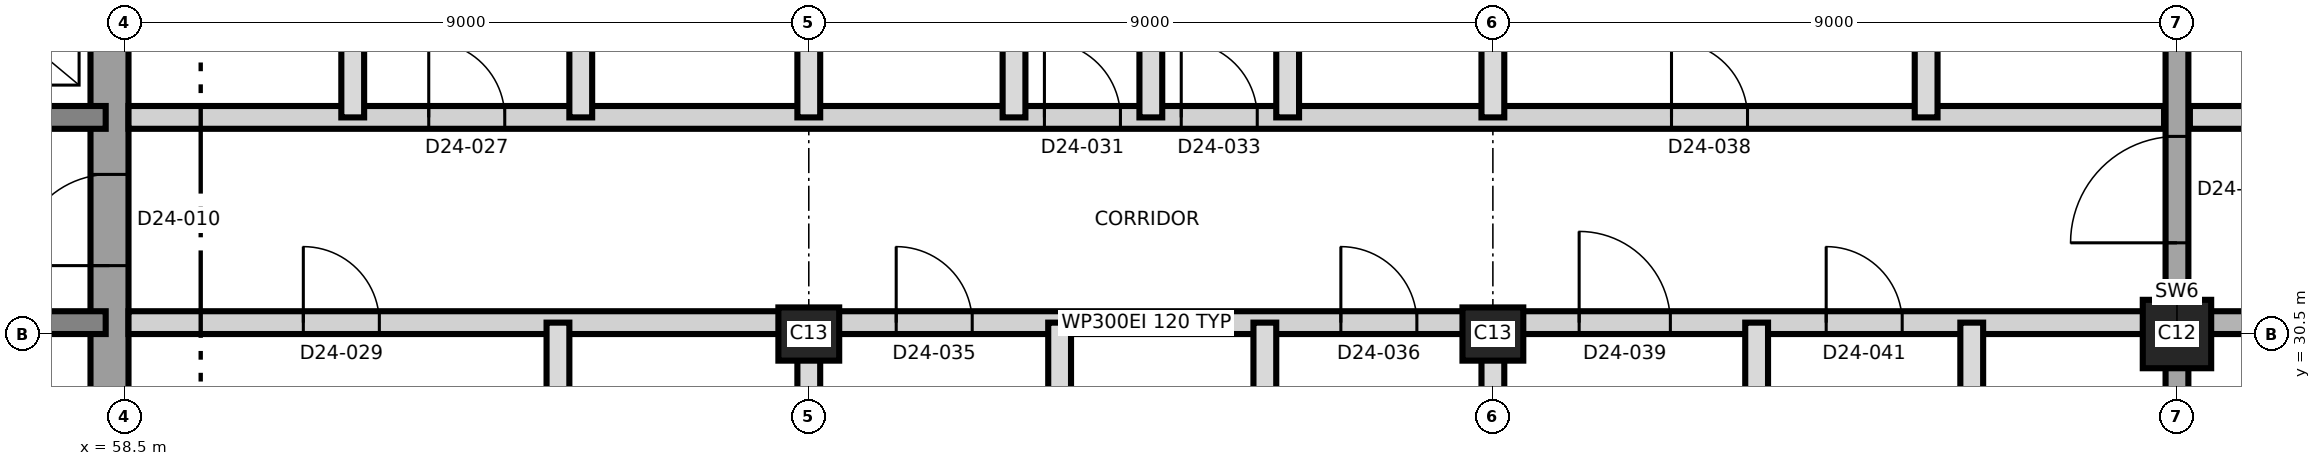
"""IFC4 building model, lengths in metres.
Left out: names, types, materials, properties, quantities, classifications, styles, units other than length and angle.
Written with IfcOpenShell. Run it as: python <this file> out.ifc"""

import sys

from ifc_helpers import new_model, si_unit, direction, frame, frame_2d, origin, origin_2d, place, context, subcontext, project, spatial, rectangle, extrude, element, fill, save


model = new_model("IFC4")
c1 = context("Model", 3, precision=1e-05, world=origin(), true_north=direction((0.0, 1.0)))
c2 = subcontext(c1, "Body", "Model", "MODEL_VIEW")
j1 = project(units=[si_unit("LENGTHUNIT", "METRE"), si_unit("PLANEANGLEUNIT", "RADIAN")], contexts=[c1])
p1 = place(None, origin())
s1 = spatial("IfcSite", under=j1, at=p1, CompositionType="ELEMENT")
p2 = place(p1, origin())
s2 = spatial("IfcBuilding", under=s1, at=p2, CompositionType="ELEMENT")
p3 = place(p2, frame((0.0, 0.0, 218.0)))
s3 = spatial("IfcBuildingStorey", under=s2, at=p3, CompositionType="ELEMENT", Elevation=218.0)
p4 = place(p3, frame((58.3, 21.25, 0.0), z_axis=(0.0, 0.0, 1.0), x_axis=(0.0, 1.0, 0.0)))
e1 = element("IfcWall", 1, at=p4, inside=s3, PredefinedType="SHEAR", context=c2, shape_type="SweptSolid", body=[
    extrude(rectangle(XDim=18.5, YDim=0.5, at=frame_2d((9.25, 0.0))), origin(), (0.0, 0.0, 1.0), 3.7),
])
p5 = place(p4, frame((10.15, 0.0, 0.0)))
e2 = element("IfcOpeningElement", 2, at=p5, cuts=e1, PredefinedType="OPENING", context=c2, shape_type="SweptSolid", body=[
    extrude(rectangle(XDim=1.2, YDim=2.1, at=frame_2d((0.6, 1.05))), frame((0.0, 0.26, 0.0), z_axis=(0.0, -1.0, 0.0), x_axis=(1.0, 0.0, 0.0)), (0.0, 0.0, 1.0), 0.52),
])
p6 = place(p3, frame((31.75, 30.65, 0.0), z_axis=(0.0, 0.0, 1.0), x_axis=(1.0, 0.0, 0.0)))
e3 = element("IfcWall", 3, at=p6, inside=s3, PredefinedType="SHEAR", context=c2, shape_type="SweptSolid", body=[
    extrude(rectangle(XDim=26.5, YDim=0.3, at=frame_2d((13.25, 0.0))), origin(), (0.0, 0.0, 1.0), 3.7),
])
p7 = place(p6, frame((24.75, 0.0, 0.0)))
e4 = element("IfcOpeningElement", 4, at=p7, cuts=e3, PredefinedType="OPENING", context=c2, shape_type="SweptSolid", body=[
    extrude(rectangle(XDim=1.0, YDim=2.1, at=frame_2d((0.5, 1.05))), frame((0.0, 0.16, 0.0), z_axis=(0.0, -1.0, 0.0), x_axis=(1.0, 0.0, 0.0)), (0.0, 0.0, 1.0), 0.32),
])
p8 = place(p3, frame((31.75, 33.35, 0.0), z_axis=(0.0, 0.0, 1.0), x_axis=(1.0, 0.0, 0.0)))
e5 = element("IfcWall", 5, at=p8, inside=s3, PredefinedType="SHEAR", context=c2, shape_type="SweptSolid", body=[
    extrude(rectangle(XDim=26.5, YDim=0.3, at=frame_2d((13.25, 0.0))), origin(), (0.0, 0.0, 1.0), 3.7),
])
p9 = place(p8, frame((13.9, 0.0, 0.0)))
e6 = element("IfcOpeningElement", 6, at=p9, cuts=e5, PredefinedType="OPENING", context=c2, shape_type="SweptSolid", body=[
    extrude(rectangle(XDim=1.4, YDim=2.1, at=frame_2d((0.7, 1.05))), frame((0.0, 0.16, 0.0), z_axis=(0.0, -1.0, 0.0), x_axis=(1.0, 0.0, 0.0)), (0.0, 0.0, 1.0), 0.32),
])
p10 = place(p8, frame((5.375, 0.0, 0.0)))
e7 = element("IfcOpeningElement", 7, at=p10, cuts=e5, PredefinedType="OPENING", context=c2, shape_type="SweptSolid", body=[
    extrude(rectangle(XDim=1.2, YDim=2.1, at=frame_2d((0.6, 1.05))), frame((0.0, 0.16, 0.0), z_axis=(0.0, -1.0, 0.0), x_axis=(1.0, 0.0, 0.0)), (0.0, 0.0, 1.0), 0.32),
])
p11 = place(p8, frame((19.925, 0.0, 0.0)))
e8 = element("IfcOpeningElement", 8, at=p11, cuts=e5, PredefinedType="OPENING", context=c2, shape_type="SweptSolid", body=[
    extrude(rectangle(XDim=1.2, YDim=2.1, at=frame_2d((0.6, 1.05))), frame((0.0, 0.16, 0.0), z_axis=(0.0, -1.0, 0.0), x_axis=(1.0, 0.0, 0.0)), (0.0, 0.0, 1.0), 0.32),
])
for number, where, z_axis, x_axis in (
    (9, (67.5, 30.5, 0.0), (0.0, 0.0, 1.0), (1.0, 0.0, 0.0)),
    (10, (76.5, 30.5, 0.0), (0.0, 0.0, 1.0), (1.0, 0.0, 0.0)),
):
    element("IfcColumn", number, at=place(p3, frame(where, z_axis=z_axis, x_axis=x_axis)), inside=s3, PredefinedType="COLUMN", context=c2, shape_type="SweptSolid", body=[
        extrude(rectangle(XDim=0.8, YDim=0.7, at=origin_2d()), origin(), (0.0, 0.0, 1.0), 3.7),
    ])
p12 = place(p3, frame((85.5, 30.5, 0.0), z_axis=(0.0, 0.0, 1.0), x_axis=(1.0, 0.0, 0.0)))
e11 = element("IfcColumn", 11, at=p12, inside=s3, PredefinedType="COLUMN", context=c2, shape_type="SweptSolid", body=[
    extrude(rectangle(XDim=0.9, YDim=0.9, at=origin_2d()), origin(), (0.0, 0.0, 1.0), 3.7),
])
p13 = place(p3, frame((85.5, 21.53, 0.0), z_axis=(0.0, 0.0, 1.0), x_axis=(0.0, 1.0, 0.0)))
e12 = element("IfcWall", 12, at=p13, inside=s3, PredefinedType="SHEAR", context=c2, shape_type="SweptSolid", body=[
    extrude(rectangle(XDim=17.94, YDim=0.3, at=frame_2d((8.97, 0.0))), origin(), (0.0, 0.0, 1.0), 3.7),
])
p14 = place(p13, frame((10.17, 0.0, 0.0)))
e13 = element("IfcOpeningElement", 13, at=p14, cuts=e12, PredefinedType="OPENING", context=c2, shape_type="SweptSolid", body=[
    extrude(rectangle(XDim=1.4, YDim=2.1, at=frame_2d((0.7, 1.05))), frame((0.0, 0.16, 0.0), z_axis=(0.0, -1.0, 0.0), x_axis=(1.0, 0.0, 0.0)), (0.0, 0.0, 1.0), 0.32),
])
p15 = place(p3, frame((58.55, 30.65, 0.0), z_axis=(0.0, 0.0, 1.0), x_axis=(1.0, 0.0, 0.0)))
e14 = element("IfcWall", 14, at=p15, inside=s3, PredefinedType="PARTITIONING", context=c2, shape_type="SweptSolid", body=[
    extrude(rectangle(XDim=26.78, YDim=0.3, at=frame_2d((13.39, 0.0))), origin(), (0.0, 0.0, 1.0), 3.4),
])
p16 = place(p15, frame((2.3, 0.0, 0.0)))
e15 = element("IfcOpeningElement", 15, at=p16, cuts=e14, PredefinedType="OPENING", context=c2, shape_type="SweptSolid", body=[
    extrude(rectangle(XDim=1.0, YDim=2.4, at=frame_2d((0.5, 1.2))), frame((0.0, 0.16, 0.0), z_axis=(0.0, -1.0, 0.0), x_axis=(1.0, 0.0, 0.0)), (0.0, 0.0, 1.0), 0.32),
])
p17 = place(p15, frame((10.1, 0.0, 0.0)))
e16 = element("IfcOpeningElement", 16, at=p17, cuts=e14, PredefinedType="OPENING", context=c2, shape_type="SweptSolid", body=[
    extrude(rectangle(XDim=1.0, YDim=2.1, at=frame_2d((0.5, 1.05))), frame((0.0, 0.16, 0.0), z_axis=(0.0, -1.0, 0.0), x_axis=(1.0, 0.0, 0.0)), (0.0, 0.0, 1.0), 0.32),
])
p18 = place(p15, frame((15.95, 0.0, 0.0)))
e17 = element("IfcOpeningElement", 17, at=p18, cuts=e14, PredefinedType="OPENING", context=c2, shape_type="SweptSolid", body=[
    extrude(rectangle(XDim=1.0, YDim=2.1, at=frame_2d((0.5, 1.05))), frame((0.0, 0.16, 0.0), z_axis=(0.0, -1.0, 0.0), x_axis=(1.0, 0.0, 0.0)), (0.0, 0.0, 1.0), 0.32),
])
p19 = place(p15, frame((19.085, 0.0, 0.0)))
e18 = element("IfcOpeningElement", 18, at=p19, cuts=e14, PredefinedType="OPENING", context=c2, shape_type="SweptSolid", body=[
    extrude(rectangle(XDim=1.2, YDim=2.1, at=frame_2d((0.6, 1.05))), frame((0.0, 0.16, 0.0), z_axis=(0.0, -1.0, 0.0), x_axis=(1.0, 0.0, 0.0)), (0.0, 0.0, 1.0), 0.32),
])
p20 = place(p15, frame((22.335, 0.0, 0.0)))
e19 = element("IfcOpeningElement", 19, at=p20, cuts=e14, PredefinedType="OPENING", context=c2, shape_type="SweptSolid", body=[
    extrude(rectangle(XDim=1.0, YDim=2.1, at=frame_2d((0.5, 1.05))), frame((0.0, 0.16, 0.0), z_axis=(0.0, -1.0, 0.0), x_axis=(1.0, 0.0, 0.0)), (0.0, 0.0, 1.0), 0.32),
])
p21 = place(p3, frame((85.67, 30.65, 0.0), z_axis=(0.0, 0.0, 1.0), x_axis=(1.0, 0.0, 0.0)))
e20 = element("IfcWall", 20, at=p21, inside=s3, PredefinedType="SHEAR", context=c2, shape_type="SweptSolid", body=[
    extrude(rectangle(XDim=8.8, YDim=0.3, at=frame_2d((4.4, 0.0))), origin(), (0.0, 0.0, 1.0), 3.4),
])
p22 = place(p21, frame((2.08, 0.0, 0.0)))
e21 = element("IfcOpeningElement", 21, at=p22, cuts=e20, PredefinedType="OPENING", context=c2, shape_type="SweptSolid", body=[
    extrude(rectangle(XDim=1.2, YDim=2.1, at=frame_2d((0.6, 1.05))), frame((0.0, 0.16, 0.0), z_axis=(0.0, -1.0, 0.0), x_axis=(1.0, 0.0, 0.0)), (0.0, 0.0, 1.0), 0.32),
])
p23 = place(p21, frame((5.63, 0.0, 0.0)))
e22 = element("IfcOpeningElement", 22, at=p23, cuts=e20, PredefinedType="OPENING", context=c2, shape_type="SweptSolid", body=[
    extrude(rectangle(XDim=1.0, YDim=2.1, at=frame_2d((0.5, 1.05))), frame((0.0, 0.16, 0.0), z_axis=(0.0, -1.0, 0.0), x_axis=(1.0, 0.0, 0.0)), (0.0, 0.0, 1.0), 0.32),
])
p24 = place(p3, frame((58.55, 33.35, 0.0), z_axis=(0.0, 0.0, 1.0), x_axis=(1.0, 0.0, 0.0)))
e23 = element("IfcWall", 23, at=p24, inside=s3, PredefinedType="PARTITIONING", context=c2, shape_type="SweptSolid", body=[
    extrude(rectangle(XDim=26.78, YDim=0.3, at=frame_2d((13.39, 0.0))), origin(), (0.0, 0.0, 1.0), 3.4),
])
p25 = place(p24, frame((3.95, 0.0, 0.0)))
e24 = element("IfcOpeningElement", 24, at=p25, cuts=e23, PredefinedType="OPENING", context=c2, shape_type="SweptSolid", body=[
    extrude(rectangle(XDim=1.0, YDim=2.4, at=frame_2d((0.5, 1.2))), frame((0.0, 0.16, 0.0), z_axis=(0.0, -1.0, 0.0), x_axis=(1.0, 0.0, 0.0)), (0.0, 0.0, 1.0), 0.32),
])
p26 = place(p24, frame((12.05, 0.0, 0.0)))
e25 = element("IfcOpeningElement", 25, at=p26, cuts=e23, PredefinedType="OPENING", context=c2, shape_type="SweptSolid", body=[
    extrude(rectangle(XDim=1.0, YDim=2.1, at=frame_2d((0.5, 1.05))), frame((0.0, 0.16, 0.0), z_axis=(0.0, -1.0, 0.0), x_axis=(1.0, 0.0, 0.0)), (0.0, 0.0, 1.0), 0.32),
])
p27 = place(p24, frame((13.85, 0.0, 0.0)))
e26 = element("IfcOpeningElement", 26, at=p27, cuts=e23, PredefinedType="OPENING", context=c2, shape_type="SweptSolid", body=[
    extrude(rectangle(XDim=1.0, YDim=2.1, at=frame_2d((0.5, 1.05))), frame((0.0, 0.16, 0.0), z_axis=(0.0, -1.0, 0.0), x_axis=(1.0, 0.0, 0.0)), (0.0, 0.0, 1.0), 0.32),
])
p28 = place(p24, frame((20.3, 0.0, 0.0)))
e27 = element("IfcOpeningElement", 27, at=p28, cuts=e23, PredefinedType="OPENING", context=c2, shape_type="SweptSolid", body=[
    extrude(rectangle(XDim=1.0, YDim=2.4, at=frame_2d((0.5, 1.2))), frame((0.0, 0.16, 0.0), z_axis=(0.0, -1.0, 0.0), x_axis=(1.0, 0.0, 0.0)), (0.0, 0.0, 1.0), 0.32),
])
p29 = place(p3, frame((85.67, 33.35, 0.0), z_axis=(0.0, 0.0, 1.0), x_axis=(1.0, 0.0, 0.0)))
e28 = element("IfcWall", 28, at=p29, inside=s3, PredefinedType="PARTITIONING", context=c2, shape_type="SweptSolid", body=[
    extrude(rectangle(XDim=8.685, YDim=0.3, at=frame_2d((4.343, 0.0))), origin(), (0.0, 0.0, 1.0), 3.4),
])
p30 = place(p29, frame((1.83, 0.0, 0.0)))
e29 = element("IfcOpeningElement", 29, at=p30, cuts=e28, PredefinedType="OPENING", context=c2, shape_type="SweptSolid", body=[
    extrude(rectangle(XDim=1.0, YDim=2.1, at=frame_2d((0.5, 1.05))), frame((0.0, 0.16, 0.0), z_axis=(0.0, -1.0, 0.0), x_axis=(1.0, 0.0, 0.0)), (0.0, 0.0, 1.0), 0.32),
])
p31 = place(p29, frame((5.63, 0.0, 0.0)))
e30 = element("IfcOpeningElement", 30, at=p31, cuts=e28, PredefinedType="OPENING", context=c2, shape_type="SweptSolid", body=[
    extrude(rectangle(XDim=1.0, YDim=2.1, at=frame_2d((0.5, 1.05))), frame((0.0, 0.16, 0.0), z_axis=(0.0, -1.0, 0.0), x_axis=(1.0, 0.0, 0.0)), (0.0, 0.0, 1.0), 0.32),
])
p32 = place(p3, frame((61.5, 33.35, 0.0), z_axis=(0.0, 0.0, 1.0), x_axis=(0.0, 1.0, 0.0)))
e31 = element("IfcWall", 31, at=p32, inside=s3, PredefinedType="PARTITIONING", context=c2, shape_type="SweptSolid", body=[
    extrude(rectangle(XDim=3.3, YDim=0.3, at=frame_2d((1.65, 0.0))), origin(), (0.0, 0.0, 1.0), 3.4),
])
p33 = place(p3, frame((64.2, 27.15, 0.0), z_axis=(0.0, 0.0, 1.0), x_axis=(0.0, 1.0, 0.0)))
e32 = element("IfcWall", 32, at=p33, inside=s3, PredefinedType="PARTITIONING", context=c2, shape_type="SweptSolid", body=[
    extrude(rectangle(XDim=3.5, YDim=0.3, at=frame_2d((1.75, 0.0))), origin(), (0.0, 0.0, 1.0), 3.4),
])
p34 = place(p3, frame((64.5, 33.35, 0.0), z_axis=(0.0, 0.0, 1.0), x_axis=(0.0, 1.0, 0.0)))
e33 = element("IfcWall", 33, at=p34, inside=s3, PredefinedType="PARTITIONING", context=c2, shape_type="SweptSolid", body=[
    extrude(rectangle(XDim=3.3, YDim=0.3, at=frame_2d((1.65, 0.0))), origin(), (0.0, 0.0, 1.0), 3.4),
])
p35 = place(p3, frame((67.5, 21.53, 0.0), z_axis=(0.0, 0.0, 1.0), x_axis=(0.0, 1.0, 0.0)))
e34 = element("IfcWall", 34, at=p35, inside=s3, PredefinedType="PARTITIONING", context=c2, shape_type="SweptSolid", body=[
    extrude(rectangle(XDim=9.12, YDim=0.3, at=frame_2d((4.56, 0.0))), origin(), (0.0, 0.0, 1.0), 3.4),
])
p36 = place(p3, frame((67.5, 33.35, 0.0), z_axis=(0.0, 0.0, 1.0), x_axis=(0.0, 1.0, 0.0)))
e35 = element("IfcWall", 35, at=p36, inside=s3, PredefinedType="PARTITIONING", context=c2, shape_type="SweptSolid", body=[
    extrude(rectangle(XDim=6.12, YDim=0.3, at=frame_2d((3.06, 0.0))), origin(), (0.0, 0.0, 1.0), 3.4),
])
for number, where, z_axis, x_axis in (
    (36, (70.2, 33.35, 0.0), (0.0, 0.0, 1.0), (0.0, 1.0, 0.0)),
    (37, (70.8, 27.45, 0.0), (0.0, 0.0, 1.0), (0.0, 1.0, 0.0)),
):
    element("IfcWall", number, at=place(p3, frame(where, z_axis=z_axis, x_axis=x_axis)), inside=s3, PredefinedType="PARTITIONING", context=c2, shape_type="SweptSolid", body=[
        extrude(rectangle(XDim=3.2, YDim=0.3, at=frame_2d((1.6, 0.0))), origin(), (0.0, 0.0, 1.0), 3.4),
    ])
p37 = place(p3, frame((72.0, 33.35, 0.0), z_axis=(0.0, 0.0, 1.0), x_axis=(0.0, 1.0, 0.0)))
e38 = element("IfcWall", 38, at=p37, inside=s3, PredefinedType="PARTITIONING", context=c2, shape_type="SweptSolid", body=[
    extrude(rectangle(XDim=6.3, YDim=0.3, at=frame_2d((3.15, 0.0))), origin(), (0.0, 0.0, 1.0), 3.4),
])
p38 = place(p3, frame((73.5, 21.53, 0.0), z_axis=(0.0, 0.0, 1.0), x_axis=(0.0, 1.0, 0.0)))
e39 = element("IfcWall", 39, at=p38, inside=s3, PredefinedType="PARTITIONING", context=c2, shape_type="SweptSolid", body=[
    extrude(rectangle(XDim=9.12, YDim=0.3, at=frame_2d((4.56, 0.0))), origin(), (0.0, 0.0, 1.0), 3.4),
])
p39 = place(p3, frame((73.8, 33.35, 0.0), z_axis=(0.0, 0.0, 1.0), x_axis=(0.0, 1.0, 0.0)))
e40 = element("IfcWall", 40, at=p39, inside=s3, PredefinedType="PARTITIONING", context=c2, shape_type="SweptSolid", body=[
    extrude(rectangle(XDim=3.2, YDim=0.3, at=frame_2d((1.6, 0.0))), origin(), (0.0, 0.0, 1.0), 3.4),
])
p40 = place(p3, frame((76.5, 21.53, 0.0), z_axis=(0.0, 0.0, 1.0), x_axis=(0.0, 1.0, 0.0)))
e41 = element("IfcWall", 41, at=p40, inside=s3, PredefinedType="PARTITIONING", context=c2, shape_type="SweptSolid", body=[
    extrude(rectangle(XDim=9.12, YDim=0.3, at=frame_2d((4.56, 0.0))), origin(), (0.0, 0.0, 1.0), 3.4),
])
p41 = place(p3, frame((76.5, 33.35, 0.0), z_axis=(0.0, 0.0, 1.0), x_axis=(0.0, 1.0, 0.0)))
e42 = element("IfcWall", 42, at=p41, inside=s3, PredefinedType="PARTITIONING", context=c2, shape_type="SweptSolid", body=[
    extrude(rectangle(XDim=6.12, YDim=0.3, at=frame_2d((3.06, 0.0))), origin(), (0.0, 0.0, 1.0), 3.4),
])
p42 = place(p3, frame((79.97, 21.53, 0.0), z_axis=(0.0, 0.0, 1.0), x_axis=(0.0, 1.0, 0.0)))
e43 = element("IfcWall", 43, at=p42, inside=s3, PredefinedType="PARTITIONING", context=c2, shape_type="SweptSolid", body=[
    extrude(rectangle(XDim=9.12, YDim=0.3, at=frame_2d((4.56, 0.0))), origin(), (0.0, 0.0, 1.0), 3.4),
])
p43 = place(p3, frame((82.2, 33.35, 0.0), z_axis=(0.0, 0.0, 1.0), x_axis=(0.0, 1.0, 0.0)))
e44 = element("IfcWall", 44, at=p43, inside=s3, PredefinedType="PARTITIONING", context=c2, shape_type="SweptSolid", body=[
    extrude(rectangle(XDim=3.5, YDim=0.3, at=frame_2d((1.75, 0.0))), origin(), (0.0, 0.0, 1.0), 3.4),
])
p44 = place(p3, frame((82.8, 27.45, 0.0), z_axis=(0.0, 0.0, 1.0), x_axis=(0.0, 1.0, 0.0)))
e45 = element("IfcWall", 45, at=p44, inside=s3, PredefinedType="PARTITIONING", context=c2, shape_type="SweptSolid", body=[
    extrude(rectangle(XDim=3.2, YDim=0.3, at=frame_2d((1.6, 0.0))), origin(), (0.0, 0.0, 1.0), 3.4),
])
p45 = place(p5, origin())
e46 = element("IfcDoor", 46, at=p45, inside=s3, OperationType="SINGLE_SWING_LEFT", PredefinedType="DOOR", context=c2, shape_type="SweptSolid", body=[
    extrude(rectangle(XDim=1.2, YDim=2.1, at=frame_2d((0.6, 1.05))), frame((0.0, 0.025, 0.0), z_axis=(0.0, -1.0, 0.0), x_axis=(1.0, 0.0, 0.0)), (0.0, 0.0, 1.0), 0.05),
])
fill(e2, e46)
p46 = place(p25, origin())
e47 = element("IfcDoor", 47, at=p46, inside=s3, OperationType="SINGLE_SWING_LEFT", PredefinedType="DOOR", context=c2, shape_type="SweptSolid", body=[
    extrude(rectangle(XDim=1.0, YDim=2.4, at=frame_2d((0.5, 1.2))), frame((0.0, 0.025, 0.0), z_axis=(0.0, -1.0, 0.0), x_axis=(1.0, 0.0, 0.0)), (0.0, 0.0, 1.0), 0.05),
])
fill(e24, e47)
p47 = place(p16, origin())
e48 = element("IfcDoor", 48, at=p47, inside=s3, OperationType="SINGLE_SWING_LEFT", PredefinedType="DOOR", context=c2, shape_type="SweptSolid", body=[
    extrude(rectangle(XDim=1.0, YDim=2.4, at=frame_2d((0.5, 1.2))), frame((0.0, 0.025, 0.0), z_axis=(0.0, -1.0, 0.0), x_axis=(1.0, 0.0, 0.0)), (0.0, 0.0, 1.0), 0.05),
])
fill(e15, e48)
p48 = place(p26, origin())
e49 = element("IfcDoor", 49, at=p48, inside=s3, OperationType="SINGLE_SWING_RIGHT", PredefinedType="DOOR", context=c2, shape_type="SweptSolid", body=[
    extrude(rectangle(XDim=1.0, YDim=2.1, at=frame_2d((0.5, 1.05))), frame((0.0, 0.025, 0.0), z_axis=(0.0, -1.0, 0.0), x_axis=(1.0, 0.0, 0.0)), (0.0, 0.0, 1.0), 0.05),
])
fill(e25, e49)
p49 = place(p27, origin())
e50 = element("IfcDoor", 50, at=p49, inside=s3, OperationType="SINGLE_SWING_LEFT", PredefinedType="DOOR", context=c2, shape_type="SweptSolid", body=[
    extrude(rectangle(XDim=1.0, YDim=2.1, at=frame_2d((0.5, 1.05))), frame((0.0, 0.025, 0.0), z_axis=(0.0, -1.0, 0.0), x_axis=(1.0, 0.0, 0.0)), (0.0, 0.0, 1.0), 0.05),
])
fill(e26, e50)
p50 = place(p17, origin())
e51 = element("IfcDoor", 51, at=p50, inside=s3, OperationType="SINGLE_SWING_LEFT", PredefinedType="DOOR", context=c2, shape_type="SweptSolid", body=[
    extrude(rectangle(XDim=1.0, YDim=2.1, at=frame_2d((0.5, 1.05))), frame((0.0, 0.025, 0.0), z_axis=(0.0, -1.0, 0.0), x_axis=(1.0, 0.0, 0.0)), (0.0, 0.0, 1.0), 0.05),
])
fill(e16, e51)
p51 = place(p18, origin())
e52 = element("IfcDoor", 52, at=p51, inside=s3, OperationType="SINGLE_SWING_RIGHT", PredefinedType="DOOR", context=c2, shape_type="SweptSolid", body=[
    extrude(rectangle(XDim=1.0, YDim=2.1, at=frame_2d((0.5, 1.05))), frame((0.0, 0.025, 0.0), z_axis=(0.0, -1.0, 0.0), x_axis=(1.0, 0.0, 0.0)), (0.0, 0.0, 1.0), 0.05),
])
fill(e17, e52)
p52 = place(p28, origin())
e53 = element("IfcDoor", 53, at=p52, inside=s3, OperationType="SINGLE_SWING_LEFT", PredefinedType="DOOR", context=c2, shape_type="SweptSolid", body=[
    extrude(rectangle(XDim=1.0, YDim=2.4, at=frame_2d((0.5, 1.2))), frame((0.0, 0.025, 0.0), z_axis=(0.0, -1.0, 0.0), x_axis=(1.0, 0.0, 0.0)), (0.0, 0.0, 1.0), 0.05),
])
fill(e27, e53)
p53 = place(p19, origin())
e54 = element("IfcDoor", 54, at=p53, inside=s3, OperationType="SINGLE_SWING_RIGHT", PredefinedType="DOOR", context=c2, shape_type="SweptSolid", body=[
    extrude(rectangle(XDim=1.2, YDim=2.1, at=frame_2d((0.6, 1.05))), frame((0.0, 0.025, 0.0), z_axis=(0.0, -1.0, 0.0), x_axis=(1.0, 0.0, 0.0)), (0.0, 0.0, 1.0), 0.05),
])
fill(e18, e54)
p54 = place(p20, origin())
e55 = element("IfcDoor", 55, at=p54, inside=s3, OperationType="SINGLE_SWING_LEFT", PredefinedType="DOOR", context=c2, shape_type="SweptSolid", body=[
    extrude(rectangle(XDim=1.0, YDim=2.1, at=frame_2d((0.5, 1.05))), frame((0.0, 0.025, 0.0), z_axis=(0.0, -1.0, 0.0), x_axis=(1.0, 0.0, 0.0)), (0.0, 0.0, 1.0), 0.05),
])
fill(e19, e55)
p55 = place(p14, origin())
e56 = element("IfcDoor", 56, at=p55, inside=s3, OperationType="SINGLE_SWING_RIGHT", PredefinedType="DOOR", context=c2, shape_type="SweptSolid", body=[
    extrude(rectangle(XDim=1.4, YDim=2.1, at=frame_2d((0.7, 1.05))), frame((0.0, 0.025, 0.0), z_axis=(0.0, -1.0, 0.0), x_axis=(1.0, 0.0, 0.0)), (0.0, 0.0, 1.0), 0.05),
])
fill(e13, e56)
save(model, sys.argv[1])
